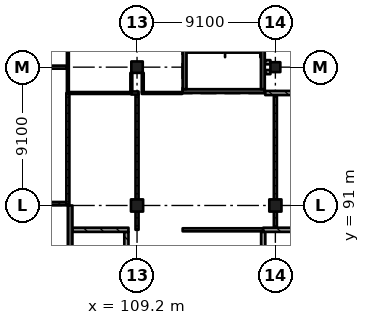
"""IFC4 building model, lengths in metres.
Left out: names, types, materials, properties, quantities, classifications, styles, units other than length and angle.
Written with IfcOpenShell. Run it as: python <this file> out.ifc"""

import sys

from ifc_helpers import new_model, si_unit, direction, frame, frame_2d, origin, origin_2d, place, context, subcontext, project, spatial, rectangle, extrude, element, fill, save


model = new_model("IFC4")
c1 = context("Model", 3, precision=1e-05, world=origin(), true_north=direction((0.0, 1.0)))
c2 = subcontext(c1, "Body", "Model", "MODEL_VIEW")
j1 = project(units=[si_unit("LENGTHUNIT", "METRE"), si_unit("PLANEANGLEUNIT", "RADIAN")], contexts=[c1])
p1 = place(None, origin())
s1 = spatial("IfcSite", under=j1, at=p1, CompositionType="ELEMENT")
p2 = place(p1, origin())
s2 = spatial("IfcBuilding", under=s1, at=p2, CompositionType="ELEMENT")
p3 = place(p2, frame((0.0, 0.0, 10.92)))
s3 = spatial("IfcBuildingStorey", under=s2, at=p3, CompositionType="ELEMENT", Elevation=10.92)
p4 = place(p3, frame((109.2, 91.0, 0.0), z_axis=(0.0, 0.0, 1.0), x_axis=(1.0, 0.0, 0.0)))
e1 = element("IfcColumn", 1, at=p4, inside=s3, PredefinedType="COLUMN", context=c2, shape_type="SweptSolid", body=[
    extrude(rectangle(XDim=0.8, YDim=0.8, at=origin_2d()), origin(), (0.0, 0.0, 1.0), 4.55),
])
p5 = place(p3, frame((109.2, 100.1, 0.0), z_axis=(0.0, 0.0, 1.0), x_axis=(1.0, 0.0, 0.0)))
e2 = element("IfcColumn", 2, at=p5, inside=s3, PredefinedType="COLUMN", context=c2, shape_type="SweptSolid", body=[
    extrude(rectangle(XDim=0.75, YDim=0.75, at=origin_2d()), origin(), (0.0, 0.0, 1.0), 4.55),
])
p6 = place(p3, frame((118.3, 91.0, 0.0), z_axis=(0.0, 0.0, 1.0), x_axis=(1.0, 0.0, 0.0)))
e3 = element("IfcColumn", 3, at=p6, inside=s3, PredefinedType="COLUMN", context=c2, shape_type="SweptSolid", body=[
    extrude(rectangle(XDim=0.8, YDim=0.8, at=origin_2d()), origin(), (0.0, 0.0, 1.0), 4.55),
])
p7 = place(p3, frame((118.3, 100.1, 0.0), z_axis=(0.0, 0.0, 1.0), x_axis=(1.0, 0.0, 0.0)))
e4 = element("IfcColumn", 4, at=p7, inside=s3, PredefinedType="COLUMN", context=c2, shape_type="SweptSolid", body=[
    extrude(rectangle(XDim=0.65, YDim=0.65, at=origin_2d()), origin(), (0.0, 0.0, 1.0), 4.55),
])
p8 = place(p3, frame((104.8, 68.25, 0.0), z_axis=(0.0, 0.0, 1.0), x_axis=(0.0, 1.0, 0.0)))
e5 = element("IfcWall", 5, at=p8, inside=s3, PredefinedType="SHEAR", context=c2, shape_type="SweptSolid", body=[
    extrude(rectangle(XDim=22.75, YDim=0.3, at=frame_2d((11.375, 0.0))), origin(), (0.0, 0.0, 1.0), 4.55),
])
p9 = place(p3, frame((117.6, 98.525, 0.0), z_axis=(0.0, 0.0, 1.0), x_axis=(-1.0, 0.0, 0.0)))
e6 = element("IfcWall", 6, at=p9, inside=s3, PredefinedType="SHEAR", context=c2, shape_type="SweptSolid", body=[
    extrude(rectangle(XDim=5.4, YDim=0.25, at=frame_2d((2.7, 0.0))), origin(), (0.0, 0.0, 1.0), 4.55),
])
p10 = place(p9, frame((1.5, 0.0, 0.0)))
e7 = element("IfcOpeningElement", 7, at=p10, cuts=e6, PredefinedType="OPENING", context=c2, shape_type="SweptSolid", body=[
    extrude(rectangle(XDim=2.4, YDim=2.1, at=frame_2d((1.2, 1.05))), frame((0.0, 0.135, 0.0), z_axis=(0.0, -1.0, 0.0), x_axis=(1.0, 0.0, 0.0)), (0.0, 0.0, 1.0), 0.27),
])
for number, where, z_axis, x_axis in (
    (8, (112.325, 108.25, 0.0), (0.0, 0.0, 1.0), (0.0, -1.0, 0.0)),
    (9, (117.475, 108.25, 0.0), (0.0, 0.0, 1.0), (0.0, -1.0, 0.0)),
):
    element("IfcWall", number, at=place(p3, frame(where, z_axis=z_axis, x_axis=x_axis)), inside=s3, PredefinedType="SHEAR", context=c2, shape_type="SweptSolid", body=[
        extrude(rectangle(XDim=9.6, YDim=0.25, at=frame_2d((4.8, 0.0))), origin(), (0.0, 0.0, 1.0), 4.55),
    ])
p11 = place(p3, frame((100.1, 100.1, 0.0), z_axis=(0.0, 0.0, 1.0), x_axis=(1.0, 0.0, 0.0)))
e10 = element("IfcWall", 10, at=p11, inside=s3, PredefinedType="PARTITIONING", context=c2, shape_type="SweptSolid", body=[
    extrude(rectangle(XDim=4.487, YDim=0.2, at=frame_2d((2.244, 0.0))), origin(), (0.0, 0.0, 1.0), 3.55),
])
p12 = place(p11, frame((1.75, 0.0, 0.0)))
e11 = element("IfcOpeningElement", 11, at=p12, cuts=e10, PredefinedType="OPENING", context=c2, shape_type="SweptSolid", body=[
    extrude(rectangle(XDim=1.0, YDim=2.1, at=frame_2d((0.5, 1.05))), frame((0.0, 0.11, 0.0), z_axis=(0.0, -1.0, 0.0), x_axis=(1.0, 0.0, 0.0)), (0.0, 0.0, 1.0), 0.22),
])
p13 = place(p3, frame((104.65, 91.03, 0.0), z_axis=(0.0, 0.0, 1.0), x_axis=(0.0, 1.0, 0.0)))
e12 = element("IfcWall", 12, at=p13, inside=s3, PredefinedType="PARTITIONING", context=c2, shape_type="SweptSolid", body=[
    extrude(rectangle(XDim=7.37, YDim=0.2, at=frame_2d((3.685, 0.0))), origin(), (0.0, 0.0, 1.0), 4.25),
])
p14 = place(p13, frame((0.95, 0.0, 0.0)))
e13 = element("IfcOpeningElement", 13, at=p14, cuts=e12, PredefinedType="OPENING", context=c2, shape_type="SweptSolid", body=[
    extrude(rectangle(XDim=1.8, YDim=2.4, at=frame_2d((0.9, 1.2))), frame((0.0, 0.11, 0.0), z_axis=(0.0, -1.0, 0.0), x_axis=(1.0, 0.0, 0.0)), (0.0, 0.0, 1.0), 0.22),
])
p15 = place(p13, frame((4.65, 0.0, 0.0)))
e14 = element("IfcOpeningElement", 14, at=p15, cuts=e12, PredefinedType="OPENING", context=c2, shape_type="SweptSolid", body=[
    extrude(rectangle(XDim=1.8, YDim=2.4, at=frame_2d((0.9, 1.2))), frame((0.0, 0.11, 0.0), z_axis=(0.0, -1.0, 0.0), x_axis=(1.0, 0.0, 0.0)), (0.0, 0.0, 1.0), 0.22),
])
p16 = place(p3, frame((104.65, 98.4, 0.0), z_axis=(0.0, 0.0, 1.0), x_axis=(0.0, 1.0, 0.0)))
e15 = element("IfcWall", 15, at=p16, inside=s3, PredefinedType="PARTITIONING", context=c2, shape_type="SweptSolid", body=[
    extrude(rectangle(XDim=10.77, YDim=0.125, at=frame_2d((5.385, 0.0))), origin(), (0.0, 0.0, 1.0), 4.25),
])
p17 = place(p3, frame((104.75, 98.4, 0.0), z_axis=(0.0, 0.0, 1.0), x_axis=(1.0, 0.0, 0.0)))
e16 = element("IfcWall", 16, at=p17, inside=s3, PredefinedType="PARTITIONING", context=c2, shape_type="SweptSolid", body=[
    extrude(rectangle(XDim=4.075, YDim=0.125, at=frame_2d((2.038, 0.0))), origin(), (0.0, 0.0, 1.0), 4.25),
])
p18 = place(p17, frame((1.55, 0.0, 0.0)))
e17 = element("IfcOpeningElement", 17, at=p18, cuts=e16, PredefinedType="OPENING", context=c2, shape_type="SweptSolid", body=[
    extrude(rectangle(XDim=0.9, YDim=2.1, at=frame_2d((0.45, 1.05))), frame((0.0, 0.073, 0.0), z_axis=(0.0, -1.0, 0.0), x_axis=(1.0, 0.0, 0.0)), (0.0, 0.0, 1.0), 0.145),
])
p19 = place(p3, frame((108.5, 82.413, 0.0), z_axis=(0.0, 0.0, 1.0), x_axis=(0.0, 1.0, 0.0)))
e18 = element("IfcWall", 18, at=p19, inside=s3, PredefinedType="SOLIDWALL", context=c2, shape_type="SweptSolid", body=[
    extrude(rectangle(XDim=6.85, YDim=0.275, at=frame_2d((3.425, 0.0))), origin(), (0.0, 0.0, 1.0), 4.25),
])
p20 = place(p3, frame((108.637, 89.4, 0.0), z_axis=(0.0, 0.0, 1.0), x_axis=(-1.0, 0.0, 0.0)))
e19 = element("IfcWall", 19, at=p20, inside=s3, PredefinedType="SOLIDWALL", context=c2, shape_type="SweptSolid", body=[
    extrude(rectangle(XDim=3.688, YDim=0.275, at=frame_2d((1.844, 0.0))), origin(), (0.0, 0.0, 1.0), 4.25),
])
p21 = place(p20, frame((1.25, 0.0, 0.0)))
e20 = element("IfcOpeningElement", 20, at=p21, cuts=e19, PredefinedType="OPENING", context=c2, shape_type="SweptSolid", body=[
    extrude(rectangle(XDim=1.2, YDim=2.4, at=frame_2d((0.6, 1.2))), frame((0.0, 0.147, 0.0), z_axis=(0.0, -1.0, 0.0), x_axis=(1.0, 0.0, 0.0)), (0.0, 0.0, 1.0), 0.295),
])
p22 = place(p3, frame((108.825, 98.5, 0.0), z_axis=(0.0, 0.0, 1.0), x_axis=(0.0, 1.0, 0.0)))
e21 = element("IfcWall", 21, at=p22, inside=s3, PredefinedType="PARTITIONING", context=c2, shape_type="SweptSolid", body=[
    extrude(rectangle(XDim=1.225, YDim=0.125, at=frame_2d((0.613, 0.0))), origin(), (0.0, 0.0, 1.0), 4.25),
])
p23 = place(p3, frame((109.2, 89.4, 0.0), z_axis=(0.0, 0.0, 1.0), x_axis=(0.0, 1.0, 0.0)))
e22 = element("IfcWall", 22, at=p23, inside=s3, PredefinedType="PARTITIONING", context=c2, shape_type="SweptSolid", body=[
    extrude(rectangle(XDim=1.2, YDim=0.2, at=frame_2d((0.6, 0.0))), origin(), (0.0, 0.0, 1.0), 3.55),
])
p24 = place(p3, frame((109.2, 91.4, 0.0), z_axis=(0.0, 0.0, 1.0), x_axis=(0.0, 1.0, 0.0)))
e23 = element("IfcWall", 23, at=p24, inside=s3, PredefinedType="PARTITIONING", context=c2, shape_type="SweptSolid", body=[
    extrude(rectangle(XDim=6.9, YDim=0.2, at=frame_2d((3.45, 0.0))), origin(), (0.0, 0.0, 1.0), 3.55),
])
p25 = place(p24, frame((0.85, 0.0, 0.0)))
e24 = element("IfcOpeningElement", 24, at=p25, cuts=e23, PredefinedType="OPENING", context=c2, shape_type="SweptSolid", body=[
    extrude(rectangle(XDim=1.8, YDim=2.4, at=frame_2d((0.9, 1.2))), frame((0.0, 0.11, 0.0), z_axis=(0.0, -1.0, 0.0), x_axis=(1.0, 0.0, 0.0)), (0.0, 0.0, 1.0), 0.22),
])
p26 = place(p24, frame((4.25, 0.0, 0.0)))
e25 = element("IfcOpeningElement", 25, at=p26, cuts=e23, PredefinedType="OPENING", context=c2, shape_type="SweptSolid", body=[
    extrude(rectangle(XDim=1.8, YDim=2.4, at=frame_2d((0.9, 1.2))), frame((0.0, 0.11, 0.0), z_axis=(0.0, -1.0, 0.0), x_axis=(1.0, 0.0, 0.0)), (0.0, 0.0, 1.0), 0.22),
])
p27 = place(p3, frame((109.3, 98.4, 0.0), z_axis=(0.0, 0.0, 1.0), x_axis=(-1.0, 0.0, 0.0)))
e26 = element("IfcWall", 26, at=p27, inside=s3, PredefinedType="PARTITIONING", context=c2, shape_type="SweptSolid", body=[
    extrude(rectangle(XDim=0.475, YDim=0.2, at=frame_2d((0.238, 0.0))), origin(), (0.0, 0.0, 1.0), 4.25),
])
p28 = place(p3, frame((109.512, 98.4, 0.0), z_axis=(0.0, 0.0, 1.0), x_axis=(1.0, 0.0, 0.0)))
e27 = element("IfcWall", 27, at=p28, inside=s3, PredefinedType="PARTITIONING", context=c2, shape_type="SweptSolid", body=[
    extrude(rectangle(XDim=2.657, YDim=0.125, at=frame_2d((1.329, 0.0))), origin(), (0.0, 0.0, 1.0), 4.25),
])
p29 = place(p3, frame((109.575, 99.725, 0.0), z_axis=(0.0, 0.0, 1.0), x_axis=(0.0, -1.0, 0.0)))
e28 = element("IfcWall", 28, at=p29, inside=s3, PredefinedType="PARTITIONING", context=c2, shape_type="SweptSolid", body=[
    extrude(rectangle(XDim=1.263, YDim=0.125, at=frame_2d((0.631, 0.0))), origin(), (0.0, 0.0, 1.0), 4.25),
])
p30 = place(p3, frame((117.5, 86.43, 0.0), z_axis=(0.0, 0.0, 1.0), x_axis=(0.0, 1.0, 0.0)))
e29 = element("IfcWall", 29, at=p30, inside=s3, PredefinedType="SOLIDWALL", context=c2, shape_type="SweptSolid", body=[
    extrude(rectangle(XDim=2.833, YDim=0.275, at=frame_2d((1.416, 0.0))), origin(), (0.0, 0.0, 1.0), 4.25),
])
p31 = place(p3, frame((117.5, 89.4, 0.0), z_axis=(0.0, 0.0, 1.0), x_axis=(-1.0, 0.0, 0.0)))
e30 = element("IfcWall", 30, at=p31, inside=s3, PredefinedType="PARTITIONING", context=c2, shape_type="SweptSolid", body=[
    extrude(rectangle(XDim=5.3, YDim=0.2, at=frame_2d((2.65, 0.0))), origin(), (0.0, 0.0, 1.0), 4.25),
])
p32 = place(p31, frame((1.75, 0.0, 0.0)))
e31 = element("IfcOpeningElement", 31, at=p32, cuts=e30, PredefinedType="OPENING", context=c2, shape_type="SweptSolid", body=[
    extrude(rectangle(XDim=1.8, YDim=2.4, at=frame_2d((0.9, 1.2))), frame((0.0, 0.11, 0.0), z_axis=(0.0, -1.0, 0.0), x_axis=(1.0, 0.0, 0.0)), (0.0, 0.0, 1.0), 0.22),
])
p33 = place(p3, frame((117.63, 98.4, 0.0), z_axis=(0.0, 0.0, 1.0), x_axis=(1.0, 0.0, 0.0)))
e32 = element("IfcWall", 32, at=p33, inside=s3, PredefinedType="SOLIDWALL", context=c2, shape_type="SweptSolid", body=[
    extrude(rectangle(XDim=3.64, YDim=0.275, at=frame_2d((1.82, 0.0))), origin(), (0.0, 0.0, 1.0), 4.25),
])
p34 = place(p33, frame((1.52, 0.0, 0.0)))
e33 = element("IfcOpeningElement", 33, at=p34, cuts=e32, PredefinedType="OPENING", context=c2, shape_type="SweptSolid", body=[
    extrude(rectangle(XDim=1.2, YDim=2.4, at=frame_2d((0.6, 1.2))), frame((0.0, 0.147, 0.0), z_axis=(0.0, -1.0, 0.0), x_axis=(1.0, 0.0, 0.0)), (0.0, 0.0, 1.0), 0.295),
])
for number, where, z_axis, x_axis in (
    (34, (117.63, 99.775, 0.0), (0.0, 0.0, 1.0), (1.0, 0.0, 0.0)),
    (35, (117.975, 100.425, 0.0), (0.0, 0.0, 1.0), (-1.0, 0.0, 0.0)),
):
    element("IfcWall", number, at=place(p3, frame(where, z_axis=z_axis, x_axis=x_axis)), inside=s3, PredefinedType="SOLIDWALL", context=c2, shape_type="SweptSolid", body=[
        extrude(rectangle(XDim=0.345, YDim=0.275, at=frame_2d((0.173, 0.0))), origin(), (0.0, 0.0, 1.0), 4.25),
    ])
p35 = place(p3, frame((117.5, 89.4, 0.0), z_axis=(0.0, 0.0, 1.0), x_axis=(1.0, 0.0, 0.0)))
e36 = element("IfcWall", 36, at=p35, inside=s3, PredefinedType="SOLIDWALL", context=c2, shape_type="SweptSolid", body=[
    extrude(rectangle(XDim=3.8, YDim=0.275, at=frame_2d((1.9, 0.0))), origin(), (0.0, 0.0, 1.0), 4.25),
])
p36 = place(p35, frame((1.65, 0.0, 0.0)))
e37 = element("IfcOpeningElement", 37, at=p36, cuts=e36, PredefinedType="OPENING", context=c2, shape_type="SweptSolid", body=[
    extrude(rectangle(XDim=1.2, YDim=2.4, at=frame_2d((0.6, 1.2))), frame((0.0, 0.147, 0.0), z_axis=(0.0, -1.0, 0.0), x_axis=(1.0, 0.0, 0.0)), (0.0, 0.0, 1.0), 0.295),
])
p37 = place(p3, frame((118.3, 89.538, 0.0), z_axis=(0.0, 0.0, 1.0), x_axis=(0.0, 1.0, 0.0)))
e38 = element("IfcWall", 38, at=p37, inside=s3, PredefinedType="PARTITIONING", context=c2, shape_type="SweptSolid", body=[
    extrude(rectangle(XDim=1.062, YDim=0.2, at=frame_2d((0.531, 0.0))), origin(), (0.0, 0.0, 1.0), 3.55),
])
p38 = place(p3, frame((118.3, 91.4, 0.0), z_axis=(0.0, 0.0, 1.0), x_axis=(0.0, 1.0, 0.0)))
e39 = element("IfcWall", 39, at=p38, inside=s3, PredefinedType="PARTITIONING", context=c2, shape_type="SweptSolid", body=[
    extrude(rectangle(XDim=6.863, YDim=0.2, at=frame_2d((3.431, 0.0))), origin(), (0.0, 0.0, 1.0), 3.55),
])
p39 = place(p38, frame((0.85, 0.0, 0.0)))
e40 = element("IfcOpeningElement", 40, at=p39, cuts=e39, PredefinedType="OPENING", context=c2, shape_type="SweptSolid", body=[
    extrude(rectangle(XDim=1.8, YDim=2.4, at=frame_2d((0.9, 1.2))), frame((0.0, 0.11, 0.0), z_axis=(0.0, -1.0, 0.0), x_axis=(1.0, 0.0, 0.0)), (0.0, 0.0, 1.0), 0.22),
])
p40 = place(p38, frame((4.25, 0.0, 0.0)))
e41 = element("IfcOpeningElement", 41, at=p40, cuts=e39, PredefinedType="OPENING", context=c2, shape_type="SweptSolid", body=[
    extrude(rectangle(XDim=1.8, YDim=2.4, at=frame_2d((0.9, 1.2))), frame((0.0, 0.11, 0.0), z_axis=(0.0, -1.0, 0.0), x_axis=(1.0, 0.0, 0.0)), (0.0, 0.0, 1.0), 0.22),
])
p41 = place(p3, frame((104.55, 91.13, 0.0), z_axis=(0.0, 0.0, 1.0), x_axis=(-1.0, 0.0, 0.0)))
e42 = element("IfcWall", 42, at=p41, inside=s3, PredefinedType="PARTITIONING", context=c2, shape_type="SweptSolid", body=[
    extrude(rectangle(XDim=4.15, YDim=0.2, at=frame_2d((2.075, 0.0))), origin(), (0.0, 0.0, 1.0), 3.55),
])
p42 = place(p41, frame((1.075, 0.0, 1.1)))
e43 = element("IfcOpeningElement", 43, at=p42, cuts=e42, PredefinedType="OPENING", context=c2, shape_type="SweptSolid", body=[
    extrude(rectangle(XDim=2.0, YDim=2.0, at=frame_2d((1.0, 1.0))), frame((0.0, 0.11, 0.0), z_axis=(0.0, -1.0, 0.0), x_axis=(1.0, 0.0, 0.0)), (0.0, 0.0, 1.0), 0.22),
])
p43 = place(p36, origin())
e44 = element("IfcDoor", 44, at=p43, inside=s3, OperationType="SINGLE_SWING_LEFT", PredefinedType="DOOR", context=c2, shape_type="SweptSolid", body=[
    extrude(rectangle(XDim=1.2, YDim=2.4, at=frame_2d((0.6, 1.2))), frame((0.0, 0.025, 0.0), z_axis=(0.0, -1.0, 0.0), x_axis=(1.0, 0.0, 0.0)), (0.0, 0.0, 1.0), 0.05),
])
fill(e37, e44)
p44 = place(p21, origin())
e45 = element("IfcDoor", 45, at=p44, inside=s3, OperationType="SINGLE_SWING_LEFT", PredefinedType="DOOR", context=c2, shape_type="SweptSolid", body=[
    extrude(rectangle(XDim=1.2, YDim=2.4, at=frame_2d((0.6, 1.2))), frame((0.0, 0.025, 0.0), z_axis=(0.0, -1.0, 0.0), x_axis=(1.0, 0.0, 0.0)), (0.0, 0.0, 1.0), 0.05),
])
fill(e20, e45)
p45 = place(p34, origin())
e46 = element("IfcDoor", 46, at=p45, inside=s3, OperationType="SINGLE_SWING_RIGHT", PredefinedType="DOOR", context=c2, shape_type="SweptSolid", body=[
    extrude(rectangle(XDim=1.2, YDim=2.4, at=frame_2d((0.6, 1.2))), frame((0.0, 0.025, 0.0), z_axis=(0.0, -1.0, 0.0), x_axis=(1.0, 0.0, 0.0)), (0.0, 0.0, 1.0), 0.05),
])
fill(e33, e46)
p46 = place(p18, origin())
e47 = element("IfcDoor", 47, at=p46, inside=s3, OperationType="SINGLE_SWING_RIGHT", PredefinedType="DOOR", context=c2, shape_type="SweptSolid", body=[
    extrude(rectangle(XDim=0.9, YDim=2.1, at=frame_2d((0.45, 1.05))), frame((0.0, 0.025, 0.0), z_axis=(0.0, -1.0, 0.0), x_axis=(1.0, 0.0, 0.0)), (0.0, 0.0, 1.0), 0.05),
])
fill(e17, e47)
p47 = place(p39, origin())
e48 = element("IfcDoor", 48, at=p47, inside=s3, OperationType="DOUBLE_DOOR_SINGLE_SWING", PredefinedType="DOOR", context=c2, shape_type="SweptSolid", body=[
    extrude(rectangle(XDim=1.8, YDim=2.4, at=frame_2d((0.9, 1.2))), frame((0.0, 0.025, 0.0), z_axis=(0.0, -1.0, 0.0), x_axis=(1.0, 0.0, 0.0)), (0.0, 0.0, 1.0), 0.05),
])
fill(e40, e48)
p48 = place(p40, origin())
e49 = element("IfcDoor", 49, at=p48, inside=s3, OperationType="DOUBLE_DOOR_SINGLE_SWING", PredefinedType="DOOR", context=c2, shape_type="SweptSolid", body=[
    extrude(rectangle(XDim=1.8, YDim=2.4, at=frame_2d((0.9, 1.2))), frame((0.0, 0.025, 0.0), z_axis=(0.0, -1.0, 0.0), x_axis=(1.0, 0.0, 0.0)), (0.0, 0.0, 1.0), 0.05),
])
fill(e41, e49)
p49 = place(p25, origin())
e50 = element("IfcDoor", 50, at=p49, inside=s3, OperationType="DOUBLE_DOOR_SINGLE_SWING", PredefinedType="DOOR", context=c2, shape_type="SweptSolid", body=[
    extrude(rectangle(XDim=1.8, YDim=2.4, at=frame_2d((0.9, 1.2))), frame((0.0, 0.025, 0.0), z_axis=(0.0, -1.0, 0.0), x_axis=(1.0, 0.0, 0.0)), (0.0, 0.0, 1.0), 0.05),
])
fill(e24, e50)
p50 = place(p26, origin())
e51 = element("IfcDoor", 51, at=p50, inside=s3, OperationType="DOUBLE_DOOR_SINGLE_SWING", PredefinedType="DOOR", context=c2, shape_type="SweptSolid", body=[
    extrude(rectangle(XDim=1.8, YDim=2.4, at=frame_2d((0.9, 1.2))), frame((0.0, 0.025, 0.0), z_axis=(0.0, -1.0, 0.0), x_axis=(1.0, 0.0, 0.0)), (0.0, 0.0, 1.0), 0.05),
])
fill(e25, e51)
p51 = place(p32, origin())
e52 = element("IfcDoor", 52, at=p51, inside=s3, OperationType="DOUBLE_DOOR_SINGLE_SWING", PredefinedType="DOOR", context=c2, shape_type="SweptSolid", body=[
    extrude(rectangle(XDim=1.8, YDim=2.4, at=frame_2d((0.9, 1.2))), frame((0.0, 0.025, 0.0), z_axis=(0.0, -1.0, 0.0), x_axis=(1.0, 0.0, 0.0)), (0.0, 0.0, 1.0), 0.05),
])
fill(e31, e52)
p52 = place(p14, origin())
e53 = element("IfcDoor", 53, at=p52, inside=s3, OperationType="DOUBLE_DOOR_SINGLE_SWING", PredefinedType="DOOR", context=c2, shape_type="SweptSolid", body=[
    extrude(rectangle(XDim=1.8, YDim=2.4, at=frame_2d((0.9, 1.2))), frame((0.0, 0.025, 0.0), z_axis=(0.0, -1.0, 0.0), x_axis=(1.0, 0.0, 0.0)), (0.0, 0.0, 1.0), 0.05),
])
fill(e13, e53)
p53 = place(p15, origin())
e54 = element("IfcDoor", 54, at=p53, inside=s3, OperationType="DOUBLE_DOOR_SINGLE_SWING", PredefinedType="DOOR", context=c2, shape_type="SweptSolid", body=[
    extrude(rectangle(XDim=1.8, YDim=2.4, at=frame_2d((0.9, 1.2))), frame((0.0, 0.025, 0.0), z_axis=(0.0, -1.0, 0.0), x_axis=(1.0, 0.0, 0.0)), (0.0, 0.0, 1.0), 0.05),
])
fill(e14, e54)
p54 = place(p10, origin())
e55 = element("IfcDoor", 55, at=p54, inside=s3, OperationType="DOUBLE_DOOR_SINGLE_SWING", PredefinedType="DOOR", context=c2, shape_type="SweptSolid", body=[
    extrude(rectangle(XDim=2.4, YDim=2.1, at=frame_2d((1.2, 1.05))), frame((0.0, 0.025, 0.0), z_axis=(0.0, -1.0, 0.0), x_axis=(1.0, 0.0, 0.0)), (0.0, 0.0, 1.0), 0.05),
])
fill(e7, e55)
save(model, sys.argv[1])
